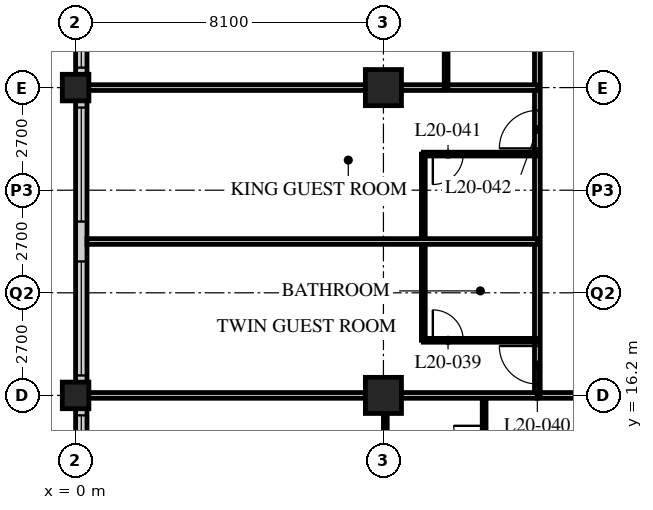
"""IFC4 building model, lengths in metres.
Left out: names, types, materials, properties, quantities, classifications, styles, units other than length and angle.
Written with IfcOpenShell. Run it as: python <this file> out.ifc"""

import sys

from ifc_helpers import new_model, si_unit, direction, frame, frame_2d, origin, origin_2d, place, context, subcontext, project, spatial, rectangle, hollow_rectangle, extrude, element, fill, save


model = new_model("IFC4")
c1 = context("Model", 3, precision=1e-05, world=origin(), true_north=direction((0.0, 1.0)))
c2 = subcontext(c1, "Body", "Model", "MODEL_VIEW")
j1 = project(units=[si_unit("LENGTHUNIT", "METRE"), si_unit("PLANEANGLEUNIT", "RADIAN")], contexts=[c1])
p1 = place(None, origin())
s1 = spatial("IfcSite", under=j1, at=p1, CompositionType="ELEMENT")
p2 = place(p1, origin())
s2 = spatial("IfcBuilding", under=s1, at=p2, CompositionType="ELEMENT")
p3 = place(p2, frame((0.0, 0.0, 80.6)))
s3 = spatial("IfcBuildingStorey", under=s2, at=p3, CompositionType="ELEMENT", Elevation=80.6)
for number, where, z_axis, x_axis in (
    (1, (0.0, 16.2, 0.0), (0.0, 0.0, 1.0), (1.0, 0.0, 0.0)),
    (2, (0.0, 24.3, 0.0), (0.0, 0.0, 1.0), (1.0, 0.0, 0.0)),
):
    element("IfcColumn", number, at=place(p3, frame(where, z_axis=z_axis, x_axis=x_axis)), inside=s3, PredefinedType="COLUMN", context=c2, shape_type="SweptSolid", body=[
        extrude(hollow_rectangle(XDim=0.7, YDim=0.7, WallThickness=0.06, at=origin_2d()), origin(), (0.0, 0.0, 1.0), 3.4),
    ])
for number, where, z_axis, x_axis in (
    (3, (8.1, 16.2, 0.0), (0.0, 0.0, 1.0), (1.0, 0.0, 0.0)),
    (4, (8.1, 24.3, 0.0), (0.0, 0.0, 1.0), (1.0, 0.0, 0.0)),
):
    element("IfcColumn", number, at=place(p3, frame(where, z_axis=z_axis, x_axis=x_axis)), inside=s3, PredefinedType="COLUMN", context=c2, shape_type="SweptSolid", body=[
        extrude(hollow_rectangle(XDim=0.95, YDim=0.95, WallThickness=0.095, at=origin_2d()), origin(), (0.0, 0.0, 1.0), 3.4),
    ])
p4 = place(p3, frame((0.15, 40.2, 0.0), z_axis=(0.0, 0.0, 1.0), x_axis=(0.0, -1.0, 0.0)))
e5 = element("IfcWall", 5, at=p4, inside=s3, PredefinedType="SOLIDWALL", context=c2, shape_type="SweptSolid", body=[
    extrude(rectangle(XDim=32.1, YDim=0.3, at=frame_2d((16.05, 0.0))), origin(), (0.0, 0.0, 1.0), 3.19),
])
p5 = place(p4, frame((0.225, 0.0, 0.9)))
e6 = element("IfcOpeningElement", 6, at=p5, cuts=e5, PredefinedType="OPENING", context=c2, shape_type="SweptSolid", body=[
    extrude(rectangle(XDim=3.0, YDim=1.5, at=frame_2d((1.5, 0.75))), frame((0.0, 0.16, 0.0), z_axis=(0.0, -1.0, 0.0), x_axis=(1.0, 0.0, 0.0)), (0.0, 0.0, 1.0), 0.32),
])
p6 = place(p4, frame((4.275, 0.0, 0.9)))
e7 = element("IfcOpeningElement", 7, at=p6, cuts=e5, PredefinedType="OPENING", context=c2, shape_type="SweptSolid", body=[
    extrude(rectangle(XDim=3.0, YDim=1.5, at=frame_2d((1.5, 0.75))), frame((0.0, 0.16, 0.0), z_axis=(0.0, -1.0, 0.0), x_axis=(1.0, 0.0, 0.0)), (0.0, 0.0, 1.0), 0.32),
])
p7 = place(p4, frame((8.325, 0.0, 0.9)))
e8 = element("IfcOpeningElement", 8, at=p7, cuts=e5, PredefinedType="OPENING", context=c2, shape_type="SweptSolid", body=[
    extrude(rectangle(XDim=3.0, YDim=1.5, at=frame_2d((1.5, 0.75))), frame((0.0, 0.16, 0.0), z_axis=(0.0, -1.0, 0.0), x_axis=(1.0, 0.0, 0.0)), (0.0, 0.0, 1.0), 0.32),
])
p8 = place(p4, frame((12.375, 0.0, 0.9)))
e9 = element("IfcOpeningElement", 9, at=p8, cuts=e5, PredefinedType="OPENING", context=c2, shape_type="SweptSolid", body=[
    extrude(rectangle(XDim=3.0, YDim=1.5, at=frame_2d((1.5, 0.75))), frame((0.0, 0.16, 0.0), z_axis=(0.0, -1.0, 0.0), x_axis=(1.0, 0.0, 0.0)), (0.0, 0.0, 1.0), 0.32),
])
p9 = place(p4, frame((16.425, 0.0, 0.9)))
e10 = element("IfcOpeningElement", 10, at=p9, cuts=e5, PredefinedType="OPENING", context=c2, shape_type="SweptSolid", body=[
    extrude(rectangle(XDim=3.0, YDim=1.5, at=frame_2d((1.5, 0.75))), frame((0.0, 0.16, 0.0), z_axis=(0.0, -1.0, 0.0), x_axis=(1.0, 0.0, 0.0)), (0.0, 0.0, 1.0), 0.32),
])
p10 = place(p4, frame((20.475, 0.0, 0.9)))
e11 = element("IfcOpeningElement", 11, at=p10, cuts=e5, PredefinedType="OPENING", context=c2, shape_type="SweptSolid", body=[
    extrude(rectangle(XDim=3.0, YDim=1.5, at=frame_2d((1.5, 0.75))), frame((0.0, 0.16, 0.0), z_axis=(0.0, -1.0, 0.0), x_axis=(1.0, 0.0, 0.0)), (0.0, 0.0, 1.0), 0.32),
])
p11 = place(p4, frame((24.525, 0.0, 0.9)))
e12 = element("IfcOpeningElement", 12, at=p11, cuts=e5, PredefinedType="OPENING", context=c2, shape_type="SweptSolid", body=[
    extrude(rectangle(XDim=3.0, YDim=1.5, at=frame_2d((1.5, 0.75))), frame((0.0, 0.16, 0.0), z_axis=(0.0, -1.0, 0.0), x_axis=(1.0, 0.0, 0.0)), (0.0, 0.0, 1.0), 0.32),
])
p12 = place(p4, frame((28.575, 0.0, 0.9)))
e13 = element("IfcOpeningElement", 13, at=p12, cuts=e5, PredefinedType="OPENING", context=c2, shape_type="SweptSolid", body=[
    extrude(rectangle(XDim=3.0, YDim=1.5, at=frame_2d((1.5, 0.75))), frame((0.0, 0.16, 0.0), z_axis=(0.0, -1.0, 0.0), x_axis=(1.0, 0.0, 0.0)), (0.0, 0.0, 1.0), 0.32),
])
p13 = place(p3, frame((12.15, 16.2, 0.0), z_axis=(0.0, 0.0, 1.0), x_axis=(1.0, 0.0, 0.0)))
e14 = element("IfcWall", 14, at=p13, inside=s3, PredefinedType="PARTITIONING", context=c2, shape_type="SweptSolid", body=[
    extrude(rectangle(XDim=36.45, YDim=0.15, at=frame_2d((18.225, 0.0))), origin(), (0.0, 0.0, 1.0), 2.428),
])
p14 = place(p13, frame((6.5, 0.0, 0.0)))
e15 = element("IfcOpeningElement", 15, at=p14, cuts=e14, PredefinedType="OPENING", context=c2, shape_type="SweptSolid", body=[
    extrude(rectangle(XDim=1.0, YDim=2.1, at=frame_2d((0.5, 1.05))), frame((0.0, 0.085, 0.0), z_axis=(0.0, -1.0, 0.0), x_axis=(1.0, 0.0, 0.0)), (0.0, 0.0, 1.0), 0.17),
])
p15 = place(p13, frame((8.4, 0.0, 0.0)))
e16 = element("IfcOpeningElement", 16, at=p15, cuts=e14, PredefinedType="OPENING", context=c2, shape_type="SweptSolid", body=[
    extrude(rectangle(XDim=1.0, YDim=2.1, at=frame_2d((0.5, 1.05))), frame((0.0, 0.085, 0.0), z_axis=(0.0, -1.0, 0.0), x_axis=(1.0, 0.0, 0.0)), (0.0, 0.0, 1.0), 0.17),
])
p16 = place(p13, frame((14.9, 0.0, 0.0)))
e17 = element("IfcOpeningElement", 17, at=p16, cuts=e14, PredefinedType="OPENING", context=c2, shape_type="SweptSolid", body=[
    extrude(rectangle(XDim=1.0, YDim=2.1, at=frame_2d((0.5, 1.05))), frame((0.0, 0.085, 0.0), z_axis=(0.0, -1.0, 0.0), x_axis=(1.0, 0.0, 0.0)), (0.0, 0.0, 1.0), 0.17),
])
p17 = place(p13, frame((16.5, 0.0, 0.0)))
e18 = element("IfcOpeningElement", 18, at=p17, cuts=e14, PredefinedType="OPENING", context=c2, shape_type="SweptSolid", body=[
    extrude(rectangle(XDim=1.0, YDim=2.1, at=frame_2d((0.5, 1.05))), frame((0.0, 0.085, 0.0), z_axis=(0.0, -1.0, 0.0), x_axis=(1.0, 0.0, 0.0)), (0.0, 0.0, 1.0), 0.17),
])
p18 = place(p13, frame((22.7, 0.0, 0.0)))
e19 = element("IfcOpeningElement", 19, at=p18, cuts=e14, PredefinedType="OPENING", context=c2, shape_type="SweptSolid", body=[
    extrude(rectangle(XDim=1.0, YDim=2.1, at=frame_2d((0.5, 1.05))), frame((0.0, 0.085, 0.0), z_axis=(0.0, -1.0, 0.0), x_axis=(1.0, 0.0, 0.0)), (0.0, 0.0, 1.0), 0.17),
])
p19 = place(p13, frame((24.9, 0.0, 0.0)))
e20 = element("IfcOpeningElement", 20, at=p19, cuts=e14, PredefinedType="OPENING", context=c2, shape_type="SweptSolid", body=[
    extrude(rectangle(XDim=1.0, YDim=2.1, at=frame_2d((0.5, 1.05))), frame((0.0, 0.085, 0.0), z_axis=(0.0, -1.0, 0.0), x_axis=(1.0, 0.0, 0.0)), (0.0, 0.0, 1.0), 0.17),
])
p20 = place(p13, frame((30.8, 0.0, 0.0)))
e21 = element("IfcOpeningElement", 21, at=p20, cuts=e14, PredefinedType="OPENING", context=c2, shape_type="SweptSolid", body=[
    extrude(rectangle(XDim=1.0, YDim=2.1, at=frame_2d((0.5, 1.05))), frame((0.0, 0.085, 0.0), z_axis=(0.0, -1.0, 0.0), x_axis=(1.0, 0.0, 0.0)), (0.0, 0.0, 1.0), 0.17),
])
p21 = place(p13, frame((1.525, 0.0, 0.0)))
e22 = element("IfcOpeningElement", 22, at=p21, cuts=e14, PredefinedType="OPENING", context=c2, shape_type="SweptSolid", body=[
    extrude(rectangle(XDim=1.0, YDim=2.1, at=frame_2d((0.5, 1.05))), frame((0.0, 0.085, 0.0), z_axis=(0.0, -1.0, 0.0), x_axis=(1.0, 0.0, 0.0)), (0.0, 0.0, 1.0), 0.17),
])
p22 = place(p13, frame((33.925, 0.0, 0.0)))
e23 = element("IfcOpeningElement", 23, at=p22, cuts=e14, PredefinedType="OPENING", context=c2, shape_type="SweptSolid", body=[
    extrude(rectangle(XDim=1.0, YDim=2.1, at=frame_2d((0.5, 1.05))), frame((0.0, 0.085, 0.0), z_axis=(0.0, -1.0, 0.0), x_axis=(1.0, 0.0, 0.0)), (0.0, 0.0, 1.0), 0.17),
])
p23 = place(p3, frame((12.15, 16.2, 0.0), z_axis=(0.0, 0.0, 1.0), x_axis=(0.0, 1.0, 0.0)))
e24 = element("IfcWall", 24, at=p23, inside=s3, PredefinedType="PARTITIONING", context=c2, shape_type="SweptSolid", body=[
    extrude(rectangle(XDim=26.1, YDim=0.15, at=frame_2d((13.05, 0.0))), origin(), (0.0, 0.0, 1.0), 3.19),
])
p24 = place(p23, frame((0.3, 0.0, 0.0)))
e25 = element("IfcOpeningElement", 25, at=p24, cuts=e24, PredefinedType="OPENING", context=c2, shape_type="SweptSolid", body=[
    extrude(rectangle(XDim=1.0, YDim=2.1, at=frame_2d((0.5, 1.05))), frame((0.0, 0.085, 0.0), z_axis=(0.0, -1.0, 0.0), x_axis=(1.0, 0.0, 0.0)), (0.0, 0.0, 1.0), 0.17),
])
p25 = place(p23, frame((6.5, 0.0, 0.0)))
e26 = element("IfcOpeningElement", 26, at=p25, cuts=e24, PredefinedType="OPENING", context=c2, shape_type="SweptSolid", body=[
    extrude(rectangle(XDim=1.0, YDim=2.1, at=frame_2d((0.5, 1.05))), frame((0.0, 0.085, 0.0), z_axis=(0.0, -1.0, 0.0), x_axis=(1.0, 0.0, 0.0)), (0.0, 0.0, 1.0), 0.17),
])
p26 = place(p23, frame((13.55, 0.0, 0.0)))
e27 = element("IfcOpeningElement", 27, at=p26, cuts=e24, PredefinedType="OPENING", context=c2, shape_type="SweptSolid", body=[
    extrude(rectangle(XDim=1.0, YDim=2.1, at=frame_2d((0.5, 1.05))), frame((0.0, 0.085, 0.0), z_axis=(0.0, -1.0, 0.0), x_axis=(1.0, 0.0, 0.0)), (0.0, 0.0, 1.0), 0.17),
])
p27 = place(p23, frame((21.65, 0.0, 0.0)))
e28 = element("IfcOpeningElement", 28, at=p27, cuts=e24, PredefinedType="OPENING", context=c2, shape_type="SweptSolid", body=[
    extrude(rectangle(XDim=1.0, YDim=2.1, at=frame_2d((0.5, 1.05))), frame((0.0, 0.085, 0.0), z_axis=(0.0, -1.0, 0.0), x_axis=(1.0, 0.0, 0.0)), (0.0, 0.0, 1.0), 0.17),
])
p28 = place(p3, frame((9.15, 17.65, 0.0), z_axis=(0.0, 0.0, 1.0), x_axis=(0.0, 1.0, 0.0)))
e29 = element("IfcWall", 29, at=p28, inside=s3, PredefinedType="PARTITIONING", context=c2, shape_type="SweptSolid", body=[
    extrude(rectangle(XDim=4.9, YDim=0.1, at=frame_2d((2.45, 0.0))), origin(), (0.0, 0.0, 1.0), 3.19),
])
p29 = place(p3, frame((12.15, 17.65, 0.0), z_axis=(0.0, 0.0, 1.0), x_axis=(-1.0, 0.0, 0.0)))
e30 = element("IfcWall", 30, at=p29, inside=s3, PredefinedType="PARTITIONING", context=c2, shape_type="SweptSolid", body=[
    extrude(rectangle(XDim=3.0, YDim=0.1, at=frame_2d((1.5, 0.0))), origin(), (0.0, 0.0, 1.0), 3.19),
])
p30 = place(p29, frame((1.95, 0.0, 0.0)))
e31 = element("IfcOpeningElement", 31, at=p30, cuts=e30, PredefinedType="OPENING", context=c2, shape_type="SweptSolid", body=[
    extrude(rectangle(XDim=0.8, YDim=2.1, at=frame_2d((0.4, 1.05))), frame((0.0, 0.06, 0.0), z_axis=(0.0, -1.0, 0.0), x_axis=(1.0, 0.0, 0.0)), (0.0, 0.0, 1.0), 0.12),
])
p31 = place(p3, frame((12.15, 20.25, 0.0), z_axis=(0.0, 0.0, 1.0), x_axis=(-1.0, 0.0, 0.0)))
e32 = element("IfcWall", 32, at=p31, inside=s3, PredefinedType="PARTITIONING", context=c2, shape_type="SweptSolid", body=[
    extrude(rectangle(XDim=11.85, YDim=0.15, at=frame_2d((5.925, 0.0))), origin(), (0.0, 0.0, 1.0), 3.19),
])
p32 = place(p3, frame((12.15, 22.55, 0.0), z_axis=(0.0, 0.0, 1.0), x_axis=(-1.0, 0.0, 0.0)))
e33 = element("IfcWall", 33, at=p32, inside=s3, PredefinedType="PARTITIONING", context=c2, shape_type="SweptSolid", body=[
    extrude(rectangle(XDim=3.0, YDim=0.1, at=frame_2d((1.5, 0.0))), origin(), (0.0, 0.0, 1.0), 3.19),
])
p33 = place(p32, frame((1.95, 0.0, 0.0)))
e34 = element("IfcOpeningElement", 34, at=p33, cuts=e33, PredefinedType="OPENING", context=c2, shape_type="SweptSolid", body=[
    extrude(rectangle(XDim=0.8, YDim=2.1, at=frame_2d((0.4, 1.05))), frame((0.0, 0.06, 0.0), z_axis=(0.0, -1.0, 0.0), x_axis=(1.0, 0.0, 0.0)), (0.0, 0.0, 1.0), 0.12),
])
p34 = place(p3, frame((12.15, 24.3, 0.0), z_axis=(0.0, 0.0, 1.0), x_axis=(-1.0, 0.0, 0.0)))
e35 = element("IfcWall", 35, at=p34, inside=s3, PredefinedType="PARTITIONING", context=c2, shape_type="SweptSolid", body=[
    extrude(rectangle(XDim=11.85, YDim=0.15, at=frame_2d((5.925, 0.0))), origin(), (0.0, 0.0, 1.0), 2.428),
])
p35 = place(p3, frame((9.75, 24.3, 0.0), z_axis=(0.0, 0.0, 1.0), x_axis=(0.0, 1.0, 0.0)))
e36 = element("IfcWall", 36, at=p35, inside=s3, PredefinedType="PARTITIONING", context=c2, shape_type="SweptSolid", body=[
    extrude(rectangle(XDim=5.2, YDim=0.1, at=frame_2d((2.6, 0.0))), origin(), (0.0, 0.0, 1.0), 3.19),
])
p36 = place(p35, frame((1.3, 0.0, 0.0)))
e37 = element("IfcOpeningElement", 37, at=p36, cuts=e36, PredefinedType="OPENING", context=c2, shape_type="SweptSolid", body=[
    extrude(rectangle(XDim=0.8, YDim=2.1, at=frame_2d((0.4, 1.05))), frame((0.0, 0.06, 0.0), z_axis=(0.0, -1.0, 0.0), x_axis=(1.0, 0.0, 0.0)), (0.0, 0.0, 1.0), 0.12),
])
p37 = place(p35, frame((3.9, 0.0, 0.0)))
e38 = element("IfcOpeningElement", 38, at=p37, cuts=e36, PredefinedType="OPENING", context=c2, shape_type="SweptSolid", body=[
    extrude(rectangle(XDim=0.8, YDim=2.1, at=frame_2d((0.4, 1.05))), frame((0.0, 0.06, 0.0), z_axis=(0.0, -1.0, 0.0), x_axis=(1.0, 0.0, 0.0)), (0.0, 0.0, 1.0), 0.12),
])
p38 = place(p3, frame((10.75, 16.2, 0.0), z_axis=(0.0, 0.0, 1.0), x_axis=(0.0, -1.0, 0.0)))
e39 = element("IfcWall", 39, at=p38, inside=s3, PredefinedType="PARTITIONING", context=c2, shape_type="SweptSolid", body=[
    extrude(rectangle(XDim=2.4, YDim=0.1, at=frame_2d((1.2, 0.0))), origin(), (0.0, 0.0, 1.0), 3.19),
])
p39 = place(p38, frame((0.8, 0.0, 0.0)))
e40 = element("IfcOpeningElement", 40, at=p39, cuts=e39, PredefinedType="OPENING", context=c2, shape_type="SweptSolid", body=[
    extrude(rectangle(XDim=0.8, YDim=2.1, at=frame_2d((0.4, 1.05))), frame((0.0, 0.06, 0.0), z_axis=(0.0, -1.0, 0.0), x_axis=(1.0, 0.0, 0.0)), (0.0, 0.0, 1.0), 0.12),
])
p40 = place(p3, frame((8.15, 16.2, 0.0), z_axis=(0.0, 0.0, 1.0), x_axis=(0.0, -1.0, 0.0)))
e41 = element("IfcWall", 41, at=p40, inside=s3, PredefinedType="PARTITIONING", context=c2, shape_type="SweptSolid", body=[
    extrude(rectangle(XDim=2.4, YDim=0.1, at=frame_2d((1.2, 0.0))), origin(), (0.0, 0.0, 1.0), 2.428),
])
p41 = place(p3, frame((0.3, 16.2, 0.0), z_axis=(0.0, 0.0, 1.0), x_axis=(1.0, 0.0, 0.0)))
e42 = element("IfcWall", 42, at=p41, inside=s3, PredefinedType="PARTITIONING", context=c2, shape_type="SweptSolid", body=[
    extrude(rectangle(XDim=11.85, YDim=0.15, at=frame_2d((5.925, 0.0))), origin(), (0.0, 0.0, 1.0), 2.428),
])
p42 = place(p8, origin())
e43 = element("IfcWindow", 43, at=p42, inside=s3, PartitioningType="SINGLE_PANEL", PredefinedType="WINDOW", context=c2, shape_type="SweptSolid", body=[
    extrude(rectangle(XDim=3.0, YDim=1.5, at=frame_2d((1.5, 0.75))), frame((0.0, 0.03, 0.0), z_axis=(0.0, -1.0, 0.0), x_axis=(1.0, 0.0, 0.0)), (0.0, 0.0, 1.0), 0.06),
])
fill(e9, e43)
p43 = place(p9, origin())
e44 = element("IfcWindow", 44, at=p43, inside=s3, PartitioningType="SINGLE_PANEL", PredefinedType="WINDOW", context=c2, shape_type="SweptSolid", body=[
    extrude(rectangle(XDim=3.0, YDim=1.5, at=frame_2d((1.5, 0.75))), frame((0.0, 0.03, 0.0), z_axis=(0.0, -1.0, 0.0), x_axis=(1.0, 0.0, 0.0)), (0.0, 0.0, 1.0), 0.06),
])
fill(e10, e44)
p44 = place(p10, origin())
e45 = element("IfcWindow", 45, at=p44, inside=s3, PartitioningType="SINGLE_PANEL", PredefinedType="WINDOW", context=c2, shape_type="SweptSolid", body=[
    extrude(rectangle(XDim=3.0, YDim=1.5, at=frame_2d((1.5, 0.75))), frame((0.0, 0.03, 0.0), z_axis=(0.0, -1.0, 0.0), x_axis=(1.0, 0.0, 0.0)), (0.0, 0.0, 1.0), 0.06),
])
fill(e11, e45)
p45 = place(p11, origin())
e46 = element("IfcWindow", 46, at=p45, inside=s3, PartitioningType="SINGLE_PANEL", PredefinedType="WINDOW", context=c2, shape_type="SweptSolid", body=[
    extrude(rectangle(XDim=3.0, YDim=1.5, at=frame_2d((1.5, 0.75))), frame((0.0, 0.03, 0.0), z_axis=(0.0, -1.0, 0.0), x_axis=(1.0, 0.0, 0.0)), (0.0, 0.0, 1.0), 0.06),
])
fill(e12, e46)
p46 = place(p30, origin())
e47 = element("IfcDoor", 47, at=p46, inside=s3, OperationType="SINGLE_SWING_LEFT", PredefinedType="DOOR", context=c2, shape_type="SweptSolid", body=[
    extrude(rectangle(XDim=0.8, YDim=2.1, at=frame_2d((0.4, 1.05))), frame((0.0, 0.025, 0.0), z_axis=(0.0, -1.0, 0.0), x_axis=(1.0, 0.0, 0.0)), (0.0, 0.0, 1.0), 0.05),
])
fill(e31, e47)
p47 = place(p24, origin())
e48 = element("IfcDoor", 48, at=p47, inside=s3, OperationType="SINGLE_SWING_RIGHT", PredefinedType="DOOR", context=c2, shape_type="SweptSolid", body=[
    extrude(rectangle(XDim=1.0, YDim=2.1, at=frame_2d((0.5, 1.05))), frame((0.0, 0.025, 0.0), z_axis=(0.0, -1.0, 0.0), x_axis=(1.0, 0.0, 0.0)), (0.0, 0.0, 1.0), 0.05),
])
fill(e25, e48)
p48 = place(p33, origin())
e49 = element("IfcDoor", 49, at=p48, inside=s3, OperationType="SINGLE_SWING_RIGHT", PredefinedType="DOOR", context=c2, shape_type="SweptSolid", body=[
    extrude(rectangle(XDim=0.8, YDim=2.1, at=frame_2d((0.4, 1.05))), frame((0.0, 0.025, 0.0), z_axis=(0.0, -1.0, 0.0), x_axis=(1.0, 0.0, 0.0)), (0.0, 0.0, 1.0), 0.05),
])
fill(e34, e49)
p49 = place(p25, origin())
e50 = element("IfcDoor", 50, at=p49, inside=s3, OperationType="SINGLE_SWING_LEFT", PredefinedType="DOOR", context=c2, shape_type="SweptSolid", body=[
    extrude(rectangle(XDim=1.0, YDim=2.1, at=frame_2d((0.5, 1.05))), frame((0.0, 0.025, 0.0), z_axis=(0.0, -1.0, 0.0), x_axis=(1.0, 0.0, 0.0)), (0.0, 0.0, 1.0), 0.05),
])
fill(e26, e50)
p50 = place(p39, origin())
e51 = element("IfcDoor", 51, at=p50, inside=s3, OperationType="SINGLE_SWING_RIGHT", PredefinedType="DOOR", context=c2, shape_type="SweptSolid", body=[
    extrude(rectangle(XDim=0.8, YDim=2.1, at=frame_2d((0.4, 1.05))), frame((0.0, 0.025, 0.0), z_axis=(0.0, -1.0, 0.0), x_axis=(1.0, 0.0, 0.0)), (0.0, 0.0, 1.0), 0.05),
])
fill(e40, e51)
save(model, sys.argv[1])
